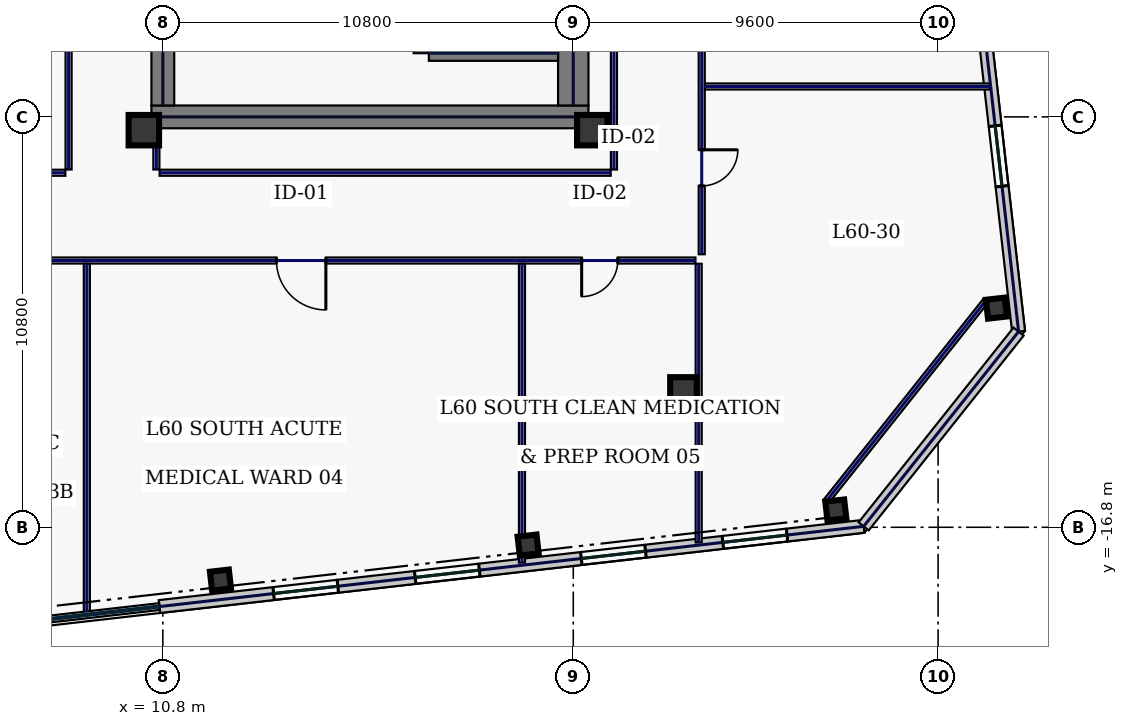
"""IFC4 building model, lengths in metres.
Left out: names, types, materials, properties, quantities, classifications, styles, units other than length and angle.
Written with IfcOpenShell. Run it as: python <this file> out.ifc"""

import sys

from ifc_helpers import new_model, si_unit, direction, frame, frame_2d, origin, origin_2d, place, context, subcontext, project, spatial, rectangle, hollow_rectangle, extrude, element, fill, save


model = new_model("IFC4")
c1 = context("Model", 3, precision=1e-05, world=origin(), true_north=direction((0.0, 1.0)))
c2 = subcontext(c1, "Body", "Model", "MODEL_VIEW")
j1 = project(units=[si_unit("LENGTHUNIT", "METRE"), si_unit("PLANEANGLEUNIT", "RADIAN")], contexts=[c1])
p1 = place(None, origin())
s1 = spatial("IfcSite", under=j1, at=p1, CompositionType="ELEMENT")
p2 = place(p1, origin())
s2 = spatial("IfcBuilding", under=s1, at=p2, CompositionType="ELEMENT")
p3 = place(p2, frame((0.0, 0.0, 259.0)))
s3 = spatial("IfcBuildingStorey", under=s2, at=p3, CompositionType="ELEMENT", Elevation=259.0)
p4 = place(p3, frame((10.5, -6.0, 0.0), z_axis=(0.0, 0.0, 1.0), x_axis=(1.0, 0.0, 0.0)))
e1 = element("IfcWall", 1, at=p4, inside=s3, PredefinedType="SHEAR", context=c2, shape_type="SweptSolid", body=[
    extrude(rectangle(XDim=11.5, YDim=0.6, at=frame_2d((5.75, 0.0))), origin(), (0.0, 0.0, 1.0), 3.74),
])
p5 = place(p3, frame((21.6, -5.7, 0.0), z_axis=(0.0, 0.0, 1.0), x_axis=(0.0, 1.0, 0.0)))
e2 = element("IfcWall", 2, at=p5, inside=s3, PredefinedType="SHEAR", context=c2, shape_type="SweptSolid", body=[
    extrude(rectangle(XDim=11.4, YDim=0.8, at=frame_2d((5.7, 0.0))), origin(), (0.0, 0.0, 1.0), 3.74),
])
p6 = place(p3, frame((10.8, -5.7, 0.0), z_axis=(0.0, 0.0, 1.0), x_axis=(0.0, 1.0, 0.0)))
e3 = element("IfcWall", 3, at=p6, inside=s3, PredefinedType="SHEAR", context=c2, shape_type="SweptSolid", body=[
    extrude(rectangle(XDim=3.05, YDim=0.6, at=frame_2d((1.525, 0.0))), origin(), (0.0, 0.0, 1.0), 3.74),
])
p7 = place(p3, frame((17.6, -4.325, 0.0), z_axis=(0.0, 0.0, 1.0), x_axis=(0.0, 1.0, 0.0)))
e4 = element("IfcWall", 4, at=p7, inside=s3, PredefinedType="SHEAR", context=c2, shape_type="SweptSolid", body=[
    extrude(rectangle(XDim=8.65, YDim=0.4, at=frame_2d((4.325, 0.0))), origin(), (0.0, 0.0, 1.0), 3.74),
])
p8 = place(p7, frame((0.25, 0.0, 0.0)))
e5 = element("IfcOpeningElement", 5, at=p8, cuts=e4, PredefinedType="OPENING", context=c2, shape_type="SweptSolid", body=[
    extrude(rectangle(XDim=1.1, YDim=2.2, at=frame_2d((0.55, 1.1))), frame((0.0, 0.21, 0.0), z_axis=(0.0, -1.0, 0.0), x_axis=(1.0, 0.0, 0.0)), (0.0, 0.0, 1.0), 0.42),
])
p9 = place(p3, frame((17.8, -4.325, 0.0), z_axis=(0.0, 0.0, 1.0), x_axis=(1.0, 0.0, 0.0)))
e6 = element("IfcWall", 6, at=p9, inside=s3, PredefinedType="SHEAR", context=c2, shape_type="SweptSolid", body=[
    extrude(rectangle(XDim=3.4, YDim=0.4, at=frame_2d((1.7, 0.0))), origin(), (0.0, 0.0, 1.0), 3.74),
])
for number, where, z_axis, x_axis in (
    (7, (10.3, -6.35, 0.0), (0.0, 0.0, 1.0), (1.0, 0.0, 0.0)),
    (8, (22.1, -6.35, 0.0), (0.0, 0.0, 1.0), (1.0, 0.0, 0.0)),
):
    element("IfcColumn", number, at=place(p3, frame(where, z_axis=z_axis, x_axis=x_axis)), inside=s3, PredefinedType="COLUMN", context=c2, shape_type="SweptSolid", body=[
        extrude(hollow_rectangle(XDim=0.8, YDim=0.8, WallThickness=0.036, at=origin_2d()), origin(), (0.0, 0.0, 1.0), 3.74),
    ])
p10 = place(p3, frame((24.5, -13.2, 0.0), z_axis=(0.0, 0.0, 1.0), x_axis=(1.0, 0.0, 0.0)))
e9 = element("IfcColumn", 9, at=p10, inside=s3, PredefinedType="COLUMN", context=c2, shape_type="SweptSolid", body=[
    extrude(hollow_rectangle(XDim=0.7, YDim=0.7, WallThickness=0.032, at=origin_2d()), origin(), (0.0, 0.0, 1.0), 3.74),
])
for number, where, z_axis, x_axis in (
    (10, (12.316, -18.19, 0.0), (0.0, 0.0, 1.0), (0.994, 0.113, 0.0)),
    (11, (20.412, -17.268, 0.0), (0.0, 0.0, 1.0), (0.994, 0.113, 0.0)),
    (12, (28.509, -16.345, 0.0), (0.0, 0.0, 1.0), (0.994, 0.113, 0.0)),
    (13, (32.734, -11.033, 0.0), (0.0, 0.0, 1.0), (0.994, 0.113, 0.0)),
):
    element("IfcColumn", number, at=place(p3, frame(where, z_axis=z_axis, x_axis=x_axis)), inside=s3, PredefinedType="COLUMN", context=c2, shape_type="SweptSolid", body=[
        extrude(hollow_rectangle(XDim=0.5, YDim=0.5, WallThickness=0.025, at=origin_2d()), origin(), (0.0, 0.0, 1.0), 3.74),
    ])
p11 = place(p3, frame((10.71, -18.886, 0.0), z_axis=(0.0, 0.0, 1.0), x_axis=(0.993572271362, 0.113199565282, 0.0)))
e14 = element("IfcWall", 14, at=p11, inside=s3, PredefinedType="STANDARD", context=c2, shape_type="SweptSolid", body=[
    extrude(rectangle(XDim=18.651, YDim=0.34, at=frame_2d((9.326, 0.0))), origin(), (0.0, 0.0, 1.0), 3.74),
])
p12 = place(p11, frame((3.024, 0.0, 0.88)))
e15 = element("IfcOpeningElement", 15, at=p12, cuts=e14, PredefinedType="OPENING", context=c2, shape_type="SweptSolid", body=[
    extrude(rectangle(XDim=1.7, YDim=1.95, at=frame_2d((0.85, 0.975))), frame((0.0, 0.18, 0.0), z_axis=(0.0, -1.0, 0.0), x_axis=(1.0, 0.0, 0.0)), (0.0, 0.0, 1.0), 0.36),
])
p13 = place(p11, frame((6.773, 0.0, 0.88)))
e16 = element("IfcOpeningElement", 16, at=p13, cuts=e14, PredefinedType="OPENING", context=c2, shape_type="SweptSolid", body=[
    extrude(rectangle(XDim=1.7, YDim=1.95, at=frame_2d((0.85, 0.975))), frame((0.0, 0.18, 0.0), z_axis=(0.0, -1.0, 0.0), x_axis=(1.0, 0.0, 0.0)), (0.0, 0.0, 1.0), 0.36),
])
p14 = place(p11, frame((11.173, 0.0, 0.88)))
e17 = element("IfcOpeningElement", 17, at=p14, cuts=e14, PredefinedType="OPENING", context=c2, shape_type="SweptSolid", body=[
    extrude(rectangle(XDim=1.7, YDim=1.95, at=frame_2d((0.85, 0.975))), frame((0.0, 0.18, 0.0), z_axis=(0.0, -1.0, 0.0), x_axis=(1.0, 0.0, 0.0)), (0.0, 0.0, 1.0), 0.36),
])
p15 = place(p11, frame((14.921, 0.0, 0.88)))
e18 = element("IfcOpeningElement", 18, at=p15, cuts=e14, PredefinedType="OPENING", context=c2, shape_type="SweptSolid", body=[
    extrude(rectangle(XDim=1.7, YDim=1.95, at=frame_2d((0.85, 0.975))), frame((0.0, 0.18, 0.0), z_axis=(0.0, -1.0, 0.0), x_axis=(1.0, 0.0, 0.0)), (0.0, 0.0, 1.0), 0.36),
])
p16 = place(p3, frame((33.318, -11.651, 0.0), z_axis=(0.0, 0.0, 1.0), x_axis=(-0.11320360501, 0.9935718111, 0.0)))
e19 = element("IfcWall", 19, at=p16, inside=s3, PredefinedType="STANDARD", context=c2, shape_type="SweptSolid", body=[
    extrude(rectangle(XDim=37.2, YDim=0.34, at=frame_2d((18.6, 0.0))), origin(), (0.0, 0.0, 1.0), 3.74),
])
p17 = place(p16, frame((3.85, 0.0, 0.58)))
e20 = element("IfcOpeningElement", 20, at=p17, cuts=e19, PredefinedType="OPENING", context=c2, shape_type="SweptSolid", body=[
    extrude(rectangle(XDim=1.6, YDim=2.3, at=frame_2d((0.8, 1.15))), frame((0.0, 0.18, 0.0), z_axis=(0.0, -1.0, 0.0), x_axis=(1.0, 0.0, 0.0)), (0.0, 0.0, 1.0), 0.36),
])
p18 = place(p16, frame((14.25, 0.0, 0.75)))
e21 = element("IfcOpeningElement", 21, at=p18, cuts=e19, PredefinedType="OPENING", context=c2, shape_type="SweptSolid", body=[
    extrude(rectangle(XDim=0.85, YDim=1.85, at=frame_2d((0.425, 0.925))), frame((0.0, 0.18, 0.0), z_axis=(0.0, -1.0, 0.0), x_axis=(1.0, 0.0, 0.0)), (0.0, 0.0, 1.0), 0.36),
])
p19 = place(p16, frame((22.45, 0.0, 0.58)))
e22 = element("IfcOpeningElement", 22, at=p19, cuts=e19, PredefinedType="OPENING", context=c2, shape_type="SweptSolid", body=[
    extrude(rectangle(XDim=1.6, YDim=2.3, at=frame_2d((0.8, 1.15))), frame((0.0, 0.18, 0.0), z_axis=(0.0, -1.0, 0.0), x_axis=(1.0, 0.0, 0.0)), (0.0, 0.0, 1.0), 0.36),
])
p20 = place(p16, frame((31.75, 0.0, 0.58)))
e23 = element("IfcOpeningElement", 23, at=p20, cuts=e19, PredefinedType="OPENING", context=c2, shape_type="SweptSolid", body=[
    extrude(rectangle(XDim=1.6, YDim=2.3, at=frame_2d((0.8, 1.15))), frame((0.0, 0.18, 0.0), z_axis=(0.0, -1.0, 0.0), x_axis=(1.0, 0.0, 0.0)), (0.0, 0.0, 1.0), 0.36),
])
p21 = place(p3, frame((29.242, -16.775, 0.0), z_axis=(0.0, 0.0, 1.0), x_axis=(0.62252823689, 0.78259733853, 0.0)))
e24 = element("IfcWall", 24, at=p21, inside=s3, PredefinedType="STANDARD", context=c2, shape_type="SweptSolid", body=[
    extrude(rectangle(XDim=6.548, YDim=0.34, at=frame_2d((3.274, 0.0))), origin(), (0.0, 0.0, 1.0), 3.74),
])
p22 = place(p3, frame((28.242, -16.134, 0.0), z_axis=(0.0, 0.0, 1.0), x_axis=(0.622521563328, 0.782602647064, 0.0)))
e25 = element("IfcWall", 25, at=p22, inside=s3, PredefinedType="PARTITIONING", context=c2, shape_type="SweptSolid", body=[
    extrude(rectangle(XDim=6.788, YDim=0.16, at=frame_2d((3.394, 0.0))), origin(), (0.0, 0.0, 1.0), 3.74),
])
p23 = place(p3, frame((24.98, 9.665, 0.0), z_axis=(0.0, 0.0, 1.0), x_axis=(0.0, -1.0, 0.0)))
e26 = element("IfcWall", 26, at=p23, inside=s3, PredefinedType="PARTITIONING", context=c2, shape_type="SweptSolid", body=[
    extrude(rectangle(XDim=19.28, YDim=0.16, at=frame_2d((9.64, 0.0))), origin(), (0.0, 0.0, 1.0), 3.74),
])
p24 = place(p23, frame((16.531, 0.0, 0.0)))
e27 = element("IfcOpeningElement", 27, at=p24, cuts=e26, PredefinedType="OPENING", context=c2, shape_type="SweptSolid", body=[
    extrude(rectangle(XDim=0.95, YDim=2.2, at=frame_2d((0.475, 1.1))), frame((0.0, 0.09, 0.0), z_axis=(0.0, -1.0, 0.0), x_axis=(1.0, 0.0, 0.0)), (0.0, 0.0, 1.0), 0.18),
])
p25 = place(p23, frame((11.25, 0.0, 0.0)))
e28 = element("IfcOpeningElement", 28, at=p25, cuts=e26, PredefinedType="OPENING", context=c2, shape_type="SweptSolid", body=[
    extrude(rectangle(XDim=0.95, YDim=2.2, at=frame_2d((0.475, 1.1))), frame((0.0, 0.09, 0.0), z_axis=(0.0, -1.0, 0.0), x_axis=(1.0, 0.0, 0.0)), (0.0, 0.0, 1.0), 0.18),
])
p26 = place(p23, frame((6.05, 0.0, 0.0)))
e29 = element("IfcOpeningElement", 29, at=p26, cuts=e26, PredefinedType="OPENING", context=c2, shape_type="SweptSolid", body=[
    extrude(rectangle(XDim=0.95, YDim=2.2, at=frame_2d((0.475, 1.1))), frame((0.0, 0.09, 0.0), z_axis=(0.0, -1.0, 0.0), x_axis=(1.0, 0.0, 0.0)), (0.0, 0.0, 1.0), 0.18),
])
p27 = place(p23, frame((1.994, 0.0, 0.0)))
e30 = element("IfcOpeningElement", 30, at=p27, cuts=e26, PredefinedType="OPENING", context=c2, shape_type="SweptSolid", body=[
    extrude(rectangle(XDim=0.95, YDim=2.2, at=frame_2d((0.475, 1.1))), frame((0.0, 0.09, 0.0), z_axis=(0.0, -1.0, 0.0), x_axis=(1.0, 0.0, 0.0)), (0.0, 0.0, 1.0), 0.18),
])
p28 = place(p3, frame((24.815, -9.78, 0.0), z_axis=(0.0, 0.0, 1.0), x_axis=(-1.0, 0.0, 0.0)))
e31 = element("IfcWall", 31, at=p28, inside=s3, PredefinedType="PARTITIONING", context=c2, shape_type="SweptSolid", body=[
    extrude(rectangle(XDim=37.35, YDim=0.16, at=frame_2d((18.675, 0.0))), origin(), (0.0, 0.0, 1.0), 3.74),
])
p29 = place(p28, frame((27.55, 0.0, 0.0)))
e32 = element("IfcOpeningElement", 32, at=p29, cuts=e31, PredefinedType="OPENING", context=c2, shape_type="SweptSolid", body=[
    extrude(rectangle(XDim=0.95, YDim=2.2, at=frame_2d((0.475, 1.1))), frame((0.0, 0.09, 0.0), z_axis=(0.0, -1.0, 0.0), x_axis=(1.0, 0.0, 0.0)), (0.0, 0.0, 1.0), 0.18),
])
p30 = place(p28, frame((19.275, 0.0, 0.0)))
e33 = element("IfcOpeningElement", 33, at=p30, cuts=e31, PredefinedType="OPENING", context=c2, shape_type="SweptSolid", body=[
    extrude(rectangle(XDim=1.3, YDim=2.2, at=frame_2d((0.65, 1.1))), frame((0.0, 0.09, 0.0), z_axis=(0.0, -1.0, 0.0), x_axis=(1.0, 0.0, 0.0)), (0.0, 0.0, 1.0), 0.18),
])
p31 = place(p28, frame((9.725, 0.0, 0.0)))
e34 = element("IfcOpeningElement", 34, at=p31, cuts=e31, PredefinedType="OPENING", context=c2, shape_type="SweptSolid", body=[
    extrude(rectangle(XDim=1.3, YDim=2.2, at=frame_2d((0.65, 1.1))), frame((0.0, 0.09, 0.0), z_axis=(0.0, -1.0, 0.0), x_axis=(1.0, 0.0, 0.0)), (0.0, 0.0, 1.0), 0.18),
])
p32 = place(p28, frame((2.044, 0.0, 0.0)))
e35 = element("IfcOpeningElement", 35, at=p32, cuts=e31, PredefinedType="OPENING", context=c2, shape_type="SweptSolid", body=[
    extrude(rectangle(XDim=0.95, YDim=2.2, at=frame_2d((0.475, 1.1))), frame((0.0, 0.09, 0.0), z_axis=(0.0, -1.0, 0.0), x_axis=(1.0, 0.0, 0.0)), (0.0, 0.0, 1.0), 0.18),
])
p33 = place(p3, frame((10.63, -6.42, 0.0), z_axis=(0.0, 0.0, 1.0), x_axis=(0.0, -1.0, 0.0)))
e36 = element("IfcWall", 36, at=p33, inside=s3, PredefinedType="PARTITIONING", context=c2, shape_type="SweptSolid", body=[
    extrude(rectangle(XDim=0.965, YDim=0.16, at=frame_2d((0.482, 0.0))), origin(), (0.0, 0.0, 1.0), 3.74),
])
p34 = place(p3, frame((10.715, -7.47, 0.0), z_axis=(0.0, 0.0, 1.0), x_axis=(1.0, 0.0, 0.0)))
e37 = element("IfcWall", 37, at=p34, inside=s3, PredefinedType="PARTITIONING", context=c2, shape_type="SweptSolid", body=[
    extrude(rectangle(XDim=11.87, YDim=0.16, at=frame_2d((5.935, 0.0))), origin(), (0.0, 0.0, 1.0), 3.74),
])
p35 = place(p3, frame((22.67, -7.385, 0.0), z_axis=(0.0, 0.0, 1.0), x_axis=(0.0, 1.0, 0.0)))
e38 = element("IfcWall", 38, at=p35, inside=s3, PredefinedType="PARTITIONING", context=c2, shape_type="SweptSolid", body=[
    extrude(rectangle(XDim=14.82, YDim=0.16, at=frame_2d((7.41, 0.0))), origin(), (0.0, 0.0, 1.0), 3.74),
])
p36 = place(p3, frame((-1.485, -7.47, 0.0), z_axis=(0.0, 0.0, 1.0), x_axis=(1.0, 0.0, 0.0)))
e39 = element("IfcWall", 39, at=p36, inside=s3, PredefinedType="PARTITIONING", context=c2, shape_type="SweptSolid", body=[
    extrude(rectangle(XDim=9.72, YDim=0.16, at=frame_2d((4.86, 0.0))), origin(), (0.0, 0.0, 1.0), 3.74),
])
p37 = place(p36, frame((7.561, 0.0, 0.0)))
e40 = element("IfcOpeningElement", 40, at=p37, cuts=e39, PredefinedType="OPENING", context=c2, shape_type="SweptSolid", body=[
    extrude(rectangle(XDim=0.95, YDim=2.2, at=frame_2d((0.475, 1.1))), frame((0.0, 0.09, 0.0), z_axis=(0.0, -1.0, 0.0), x_axis=(1.0, 0.0, 0.0)), (0.0, 0.0, 1.0), 0.18),
])
p38 = place(p3, frame((8.32, -7.385, 0.0), z_axis=(0.0, 0.0, 1.0), x_axis=(0.0, 1.0, 0.0)))
e41 = element("IfcWall", 41, at=p38, inside=s3, PredefinedType="PARTITIONING", context=c2, shape_type="SweptSolid", body=[
    extrude(rectangle(XDim=14.82, YDim=0.16, at=frame_2d((7.41, 0.0))), origin(), (0.0, 0.0, 1.0), 3.74),
])
p39 = place(p38, frame((8.736, 0.0, 0.0)))
e42 = element("IfcOpeningElement", 42, at=p39, cuts=e41, PredefinedType="OPENING", context=c2, shape_type="SweptSolid", body=[
    extrude(rectangle(XDim=0.95, YDim=2.2, at=frame_2d((0.475, 1.1))), frame((0.0, 0.09, 0.0), z_axis=(0.0, -1.0, 0.0), x_axis=(1.0, 0.0, 0.0)), (0.0, 0.0, 1.0), 0.18),
])
p40 = place(p3, frame((24.9, -17.199, 0.0), z_axis=(0.0, 0.0, 1.0), x_axis=(0.0, 1.0, 0.0)))
e43 = element("IfcWall", 43, at=p40, inside=s3, PredefinedType="PARTITIONING", context=c2, shape_type="SweptSolid", body=[
    extrude(rectangle(XDim=7.334, YDim=0.16, at=frame_2d((3.667, 0.0))), origin(), (0.0, 0.0, 1.0), 3.74),
])
p41 = place(p3, frame((8.8, -19.034, 0.0), z_axis=(0.0, 0.0, 1.0), x_axis=(0.0, 1.0, 0.0)))
e44 = element("IfcWall", 44, at=p41, inside=s3, PredefinedType="PARTITIONING", context=c2, shape_type="SweptSolid", body=[
    extrude(rectangle(XDim=9.169, YDim=0.16, at=frame_2d((4.584, 0.0))), origin(), (0.0, 0.0, 1.0), 3.74),
])
p42 = place(p3, frame((20.25, -17.729, 0.0), z_axis=(0.0, 0.0, 1.0), x_axis=(0.0, 1.0, 0.0)))
e45 = element("IfcWall", 45, at=p42, inside=s3, PredefinedType="PARTITIONING", context=c2, shape_type="SweptSolid", body=[
    extrude(rectangle(XDim=7.864, YDim=0.16, at=frame_2d((3.932, 0.0))), origin(), (0.0, 0.0, 1.0), 3.74),
])
p43 = place(p3, frame((25.065, -5.2, 0.0), z_axis=(0.0, 0.0, 1.0), x_axis=(1.0, 0.0, 0.0)))
e46 = element("IfcWall", 46, at=p43, inside=s3, PredefinedType="PARTITIONING", context=c2, shape_type="SweptSolid", body=[
    extrude(rectangle(XDim=7.498, YDim=0.16, at=frame_2d((3.749, 0.0))), origin(), (0.0, 0.0, 1.0), 3.74),
])
p44 = place(p12, origin())
e47 = element("IfcWindow", 47, at=p44, inside=s3, PartitioningType="SINGLE_PANEL", PredefinedType="WINDOW", context=c2, shape_type="SweptSolid", body=[
    extrude(rectangle(XDim=1.7, YDim=1.95, at=frame_2d((0.85, 0.975))), frame((0.0, 0.03, 0.0), z_axis=(0.0, -1.0, 0.0), x_axis=(1.0, 0.0, 0.0)), (0.0, 0.0, 1.0), 0.06),
])
fill(e15, e47)
p45 = place(p13, origin())
e48 = element("IfcWindow", 48, at=p45, inside=s3, PartitioningType="SINGLE_PANEL", PredefinedType="WINDOW", context=c2, shape_type="SweptSolid", body=[
    extrude(rectangle(XDim=1.7, YDim=1.95, at=frame_2d((0.85, 0.975))), frame((0.0, 0.03, 0.0), z_axis=(0.0, -1.0, 0.0), x_axis=(1.0, 0.0, 0.0)), (0.0, 0.0, 1.0), 0.06),
])
fill(e16, e48)
p46 = place(p14, origin())
e49 = element("IfcWindow", 49, at=p46, inside=s3, PartitioningType="SINGLE_PANEL", PredefinedType="WINDOW", context=c2, shape_type="SweptSolid", body=[
    extrude(rectangle(XDim=1.7, YDim=1.95, at=frame_2d((0.85, 0.975))), frame((0.0, 0.03, 0.0), z_axis=(0.0, -1.0, 0.0), x_axis=(1.0, 0.0, 0.0)), (0.0, 0.0, 1.0), 0.06),
])
fill(e17, e49)
p47 = place(p15, origin())
e50 = element("IfcWindow", 50, at=p47, inside=s3, PartitioningType="SINGLE_PANEL", PredefinedType="WINDOW", context=c2, shape_type="SweptSolid", body=[
    extrude(rectangle(XDim=1.7, YDim=1.95, at=frame_2d((0.85, 0.975))), frame((0.0, 0.03, 0.0), z_axis=(0.0, -1.0, 0.0), x_axis=(1.0, 0.0, 0.0)), (0.0, 0.0, 1.0), 0.06),
])
fill(e18, e50)
p48 = place(p17, origin())
e51 = element("IfcWindow", 51, at=p48, inside=s3, PartitioningType="SINGLE_PANEL", PredefinedType="WINDOW", context=c2, shape_type="SweptSolid", body=[
    extrude(rectangle(XDim=1.6, YDim=2.3, at=frame_2d((0.8, 1.15))), frame((0.0, 0.03, 0.0), z_axis=(0.0, -1.0, 0.0), x_axis=(1.0, 0.0, 0.0)), (0.0, 0.0, 1.0), 0.06),
])
fill(e20, e51)
p49 = place(p31, origin())
e52 = element("IfcDoor", 52, at=p49, inside=s3, OperationType="SINGLE_SWING_LEFT", PredefinedType="DOOR", context=c2, shape_type="SweptSolid", body=[
    extrude(rectangle(XDim=1.3, YDim=2.2, at=frame_2d((0.65, 1.1))), frame((0.0, 0.025, 0.0), z_axis=(0.0, -1.0, 0.0), x_axis=(1.0, 0.0, 0.0)), (0.0, 0.0, 1.0), 0.05),
])
fill(e34, e52)
p50 = place(p32, origin())
e53 = element("IfcDoor", 53, at=p50, inside=s3, OperationType="SINGLE_SWING_RIGHT", PredefinedType="DOOR", context=c2, shape_type="SweptSolid", body=[
    extrude(rectangle(XDim=0.95, YDim=2.2, at=frame_2d((0.475, 1.1))), frame((0.0, 0.025, 0.0), z_axis=(0.0, -1.0, 0.0), x_axis=(1.0, 0.0, 0.0)), (0.0, 0.0, 1.0), 0.05),
])
fill(e35, e53)
p51 = place(p24, origin())
e54 = element("IfcDoor", 54, at=p51, inside=s3, OperationType="SINGLE_SWING_LEFT", PredefinedType="DOOR", context=c2, shape_type="SweptSolid", body=[
    extrude(rectangle(XDim=0.95, YDim=2.2, at=frame_2d((0.475, 1.1))), frame((0.0, 0.025, 0.0), z_axis=(0.0, -1.0, 0.0), x_axis=(1.0, 0.0, 0.0)), (0.0, 0.0, 1.0), 0.05),
])
fill(e27, e54)
save(model, sys.argv[1])
